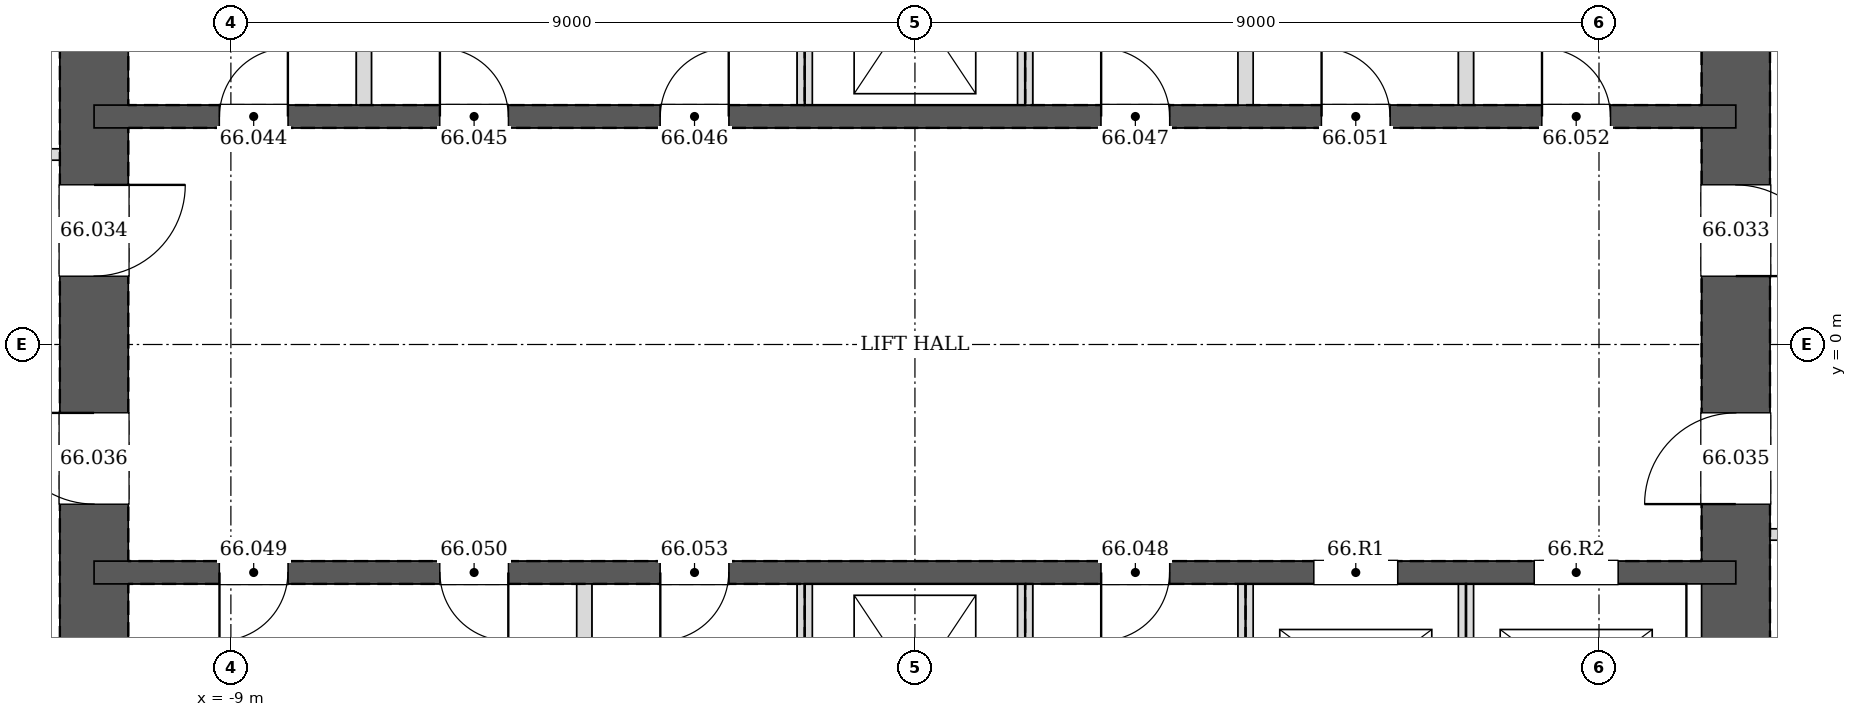
"""IFC4 building model, lengths in metres.
Left out: names, types, materials, properties, quantities, classifications, styles, units other than length and angle.
Written with IfcOpenShell. Run it as: python <this file> out.ifc"""

import sys

from ifc_helpers import new_model, si_unit, direction, frame, frame_2d, origin, place, context, subcontext, project, spatial, rectangle, extrude, element, fill, save


model = new_model("IFC4")
c1 = context("Model", 3, precision=1e-05, world=origin(), true_north=direction((0.0, 1.0)))
c2 = subcontext(c1, "Body", "Model", "MODEL_VIEW")
j1 = project(units=[si_unit("LENGTHUNIT", "METRE"), si_unit("PLANEANGLEUNIT", "RADIAN")], contexts=[c1])
p1 = place(None, origin())
s1 = spatial("IfcSite", under=j1, at=p1, CompositionType="ELEMENT")
p2 = place(p1, origin())
s2 = spatial("IfcBuilding", under=s1, at=p2, CompositionType="ELEMENT")
p3 = place(p2, frame((0.0, 0.0, 274.2)))
s3 = spatial("IfcBuildingStorey", under=s2, at=p3, CompositionType="ELEMENT", Elevation=274.2)
p4 = place(p3, frame((10.8, -10.8, 0.0), z_axis=(0.0, 0.0, 1.0), x_axis=(0.0, 1.0, 0.0)))
e1 = element("IfcWall", 1, at=p4, inside=s3, PredefinedType="SOLIDWALL", context=c2, shape_type="SweptSolid", body=[
    extrude(rectangle(XDim=21.6, YDim=0.9, at=frame_2d((10.8, 0.0))), origin(), (0.0, 0.0, 1.0), 3.4),
])
p5 = place(p4, frame((11.7, 0.0, 0.0)))
e2 = element("IfcOpeningElement", 2, at=p5, cuts=e1, PredefinedType="OPENING", context=c2, shape_type="SweptSolid", body=[
    extrude(rectangle(XDim=1.2, YDim=2.1, at=frame_2d((0.6, 1.05))), frame((0.0, 0.46, 0.0), z_axis=(0.0, -1.0, 0.0), x_axis=(1.0, 0.0, 0.0)), (0.0, 0.0, 1.0), 0.92),
])
p6 = place(p4, frame((8.7, 0.0, 0.0)))
e3 = element("IfcOpeningElement", 3, at=p6, cuts=e1, PredefinedType="OPENING", context=c2, shape_type="SweptSolid", body=[
    extrude(rectangle(XDim=1.2, YDim=2.1, at=frame_2d((0.6, 1.05))), frame((0.0, 0.46, 0.0), z_axis=(0.0, -1.0, 0.0), x_axis=(1.0, 0.0, 0.0)), (0.0, 0.0, 1.0), 0.92),
])
p7 = place(p3, frame((-10.8, 10.8, 0.0), z_axis=(0.0, 0.0, 1.0), x_axis=(0.0, -1.0, 0.0)))
e4 = element("IfcWall", 4, at=p7, inside=s3, PredefinedType="SOLIDWALL", context=c2, shape_type="SweptSolid", body=[
    extrude(rectangle(XDim=21.6, YDim=0.9, at=frame_2d((10.8, 0.0))), origin(), (0.0, 0.0, 1.0), 3.4),
])
p8 = place(p7, frame((8.7, 0.0, 0.0)))
e5 = element("IfcOpeningElement", 5, at=p8, cuts=e4, PredefinedType="OPENING", context=c2, shape_type="SweptSolid", body=[
    extrude(rectangle(XDim=1.2, YDim=2.1, at=frame_2d((0.6, 1.05))), frame((0.0, 0.46, 0.0), z_axis=(0.0, -1.0, 0.0), x_axis=(1.0, 0.0, 0.0)), (0.0, 0.0, 1.0), 0.92),
])
p9 = place(p7, frame((11.7, 0.0, 0.0)))
e6 = element("IfcOpeningElement", 6, at=p9, cuts=e4, PredefinedType="OPENING", context=c2, shape_type="SweptSolid", body=[
    extrude(rectangle(XDim=1.2, YDim=2.1, at=frame_2d((0.6, 1.05))), frame((0.0, 0.46, 0.0), z_axis=(0.0, -1.0, 0.0), x_axis=(1.0, 0.0, 0.0)), (0.0, 0.0, 1.0), 0.92),
])
p10 = place(p3, frame((-10.8, 3.0, 0.0), z_axis=(0.0, 0.0, 1.0), x_axis=(1.0, 0.0, 0.0)))
e7 = element("IfcWall", 7, at=p10, inside=s3, PredefinedType="SOLIDWALL", context=c2, shape_type="SweptSolid", body=[
    extrude(rectangle(XDim=21.6, YDim=0.3, at=frame_2d((10.8, 0.0))), origin(), (0.0, 0.0, 1.0), 3.4),
])
p11 = place(p10, frame((1.65, 0.0, 0.0)))
e8 = element("IfcOpeningElement", 8, at=p11, cuts=e7, PredefinedType="OPENING", context=c2, shape_type="SweptSolid", body=[
    extrude(rectangle(XDim=0.9, YDim=2.1, at=frame_2d((0.45, 1.05))), frame((0.0, 0.16, 0.0), z_axis=(0.0, -1.0, 0.0), x_axis=(1.0, 0.0, 0.0)), (0.0, 0.0, 1.0), 0.32),
])
p12 = place(p10, frame((4.55, 0.0, 0.0)))
e9 = element("IfcOpeningElement", 9, at=p12, cuts=e7, PredefinedType="OPENING", context=c2, shape_type="SweptSolid", body=[
    extrude(rectangle(XDim=0.9, YDim=2.1, at=frame_2d((0.45, 1.05))), frame((0.0, 0.16, 0.0), z_axis=(0.0, -1.0, 0.0), x_axis=(1.0, 0.0, 0.0)), (0.0, 0.0, 1.0), 0.32),
])
p13 = place(p10, frame((7.45, 0.0, 0.0)))
e10 = element("IfcOpeningElement", 10, at=p13, cuts=e7, PredefinedType="OPENING", context=c2, shape_type="SweptSolid", body=[
    extrude(rectangle(XDim=0.9, YDim=2.1, at=frame_2d((0.45, 1.05))), frame((0.0, 0.16, 0.0), z_axis=(0.0, -1.0, 0.0), x_axis=(1.0, 0.0, 0.0)), (0.0, 0.0, 1.0), 0.32),
])
p14 = place(p10, frame((13.25, 0.0, 0.0)))
e11 = element("IfcOpeningElement", 11, at=p14, cuts=e7, PredefinedType="OPENING", context=c2, shape_type="SweptSolid", body=[
    extrude(rectangle(XDim=0.9, YDim=2.1, at=frame_2d((0.45, 1.05))), frame((0.0, 0.16, 0.0), z_axis=(0.0, -1.0, 0.0), x_axis=(1.0, 0.0, 0.0)), (0.0, 0.0, 1.0), 0.32),
])
p15 = place(p10, frame((16.15, 0.0, 0.0)))
e12 = element("IfcOpeningElement", 12, at=p15, cuts=e7, PredefinedType="OPENING", context=c2, shape_type="SweptSolid", body=[
    extrude(rectangle(XDim=0.9, YDim=2.1, at=frame_2d((0.45, 1.05))), frame((0.0, 0.16, 0.0), z_axis=(0.0, -1.0, 0.0), x_axis=(1.0, 0.0, 0.0)), (0.0, 0.0, 1.0), 0.32),
])
p16 = place(p10, frame((19.05, 0.0, 0.0)))
e13 = element("IfcOpeningElement", 13, at=p16, cuts=e7, PredefinedType="OPENING", context=c2, shape_type="SweptSolid", body=[
    extrude(rectangle(XDim=0.9, YDim=2.1, at=frame_2d((0.45, 1.05))), frame((0.0, 0.16, 0.0), z_axis=(0.0, -1.0, 0.0), x_axis=(1.0, 0.0, 0.0)), (0.0, 0.0, 1.0), 0.32),
])
p17 = place(p3, frame((-10.8, -3.0, 0.0), z_axis=(0.0, 0.0, 1.0), x_axis=(1.0, 0.0, 0.0)))
e14 = element("IfcWall", 14, at=p17, inside=s3, PredefinedType="SOLIDWALL", context=c2, shape_type="SweptSolid", body=[
    extrude(rectangle(XDim=21.6, YDim=0.3, at=frame_2d((10.8, 0.0))), origin(), (0.0, 0.0, 1.0), 3.4),
])
p18 = place(p17, frame((13.25, 0.0, 0.0)))
e15 = element("IfcOpeningElement", 15, at=p18, cuts=e14, PredefinedType="OPENING", context=c2, shape_type="SweptSolid", body=[
    extrude(rectangle(XDim=0.9, YDim=2.1, at=frame_2d((0.45, 1.05))), frame((0.0, 0.16, 0.0), z_axis=(0.0, -1.0, 0.0), x_axis=(1.0, 0.0, 0.0)), (0.0, 0.0, 1.0), 0.32),
])
p19 = place(p17, frame((1.65, 0.0, 0.0)))
e16 = element("IfcOpeningElement", 16, at=p19, cuts=e14, PredefinedType="OPENING", context=c2, shape_type="SweptSolid", body=[
    extrude(rectangle(XDim=0.9, YDim=2.1, at=frame_2d((0.45, 1.05))), frame((0.0, 0.16, 0.0), z_axis=(0.0, -1.0, 0.0), x_axis=(1.0, 0.0, 0.0)), (0.0, 0.0, 1.0), 0.32),
])
p20 = place(p17, frame((4.55, 0.0, 0.0)))
e17 = element("IfcOpeningElement", 17, at=p20, cuts=e14, PredefinedType="OPENING", context=c2, shape_type="SweptSolid", body=[
    extrude(rectangle(XDim=0.9, YDim=2.1, at=frame_2d((0.45, 1.05))), frame((0.0, 0.16, 0.0), z_axis=(0.0, -1.0, 0.0), x_axis=(1.0, 0.0, 0.0)), (0.0, 0.0, 1.0), 0.32),
])
p21 = place(p17, frame((7.45, 0.0, 0.0)))
e18 = element("IfcOpeningElement", 18, at=p21, cuts=e14, PredefinedType="OPENING", context=c2, shape_type="SweptSolid", body=[
    extrude(rectangle(XDim=0.9, YDim=2.1, at=frame_2d((0.45, 1.05))), frame((0.0, 0.16, 0.0), z_axis=(0.0, -1.0, 0.0), x_axis=(1.0, 0.0, 0.0)), (0.0, 0.0, 1.0), 0.32),
])
p22 = place(p17, frame((16.05, 0.0, 0.0)))
e19 = element("IfcOpeningElement", 19, at=p22, cuts=e14, PredefinedType="OPENING", context=c2, shape_type="SweptSolid", body=[
    extrude(rectangle(XDim=1.1, YDim=2.1, at=frame_2d((0.55, 1.05))), frame((0.0, 0.16, 0.0), z_axis=(0.0, -1.0, 0.0), x_axis=(1.0, 0.0, 0.0)), (0.0, 0.0, 1.0), 0.32),
])
p23 = place(p17, frame((18.95, 0.0, 0.0)))
e20 = element("IfcOpeningElement", 20, at=p23, cuts=e14, PredefinedType="OPENING", context=c2, shape_type="SweptSolid", body=[
    extrude(rectangle(XDim=1.1, YDim=2.1, at=frame_2d((0.55, 1.05))), frame((0.0, 0.16, 0.0), z_axis=(0.0, -1.0, 0.0), x_axis=(1.0, 0.0, 0.0)), (0.0, 0.0, 1.0), 0.32),
])
p24 = place(p3, frame((11.25, -2.5, 0.0), z_axis=(0.0, 0.0, 1.0), x_axis=(1.0, 0.0, 0.0)))
e21 = element("IfcWall", 21, at=p24, inside=s3, PredefinedType="PARTITIONING", context=c2, shape_type="SweptSolid", body=[
    extrude(rectangle(XDim=1.8, YDim=0.15, at=frame_2d((0.9, 0.0))), origin(), (0.0, 0.0, 1.0), 3.2),
])
p25 = place(p24, frame((0.425, 0.0, 0.0)))
e22 = element("IfcOpeningElement", 22, at=p25, cuts=e21, PredefinedType="OPENING", context=c2, shape_type="SweptSolid", body=[
    extrude(rectangle(XDim=0.95, YDim=2.1, at=frame_2d((0.475, 1.05))), frame((0.0, 0.085, 0.0), z_axis=(0.0, -1.0, 0.0), x_axis=(1.0, 0.0, 0.0)), (0.0, 0.0, 1.0), 0.17),
])
p26 = place(p3, frame((-11.25, 2.5, 0.0), z_axis=(0.0, 0.0, 1.0), x_axis=(-1.0, 0.0, 0.0)))
e23 = element("IfcWall", 23, at=p26, inside=s3, PredefinedType="PARTITIONING", context=c2, shape_type="SweptSolid", body=[
    extrude(rectangle(XDim=1.8, YDim=0.15, at=frame_2d((0.9, 0.0))), origin(), (0.0, 0.0, 1.0), 3.2),
])
p27 = place(p26, frame((0.425, 0.0, 0.0)))
e24 = element("IfcOpeningElement", 24, at=p27, cuts=e23, PredefinedType="OPENING", context=c2, shape_type="SweptSolid", body=[
    extrude(rectangle(XDim=0.95, YDim=2.1, at=frame_2d((0.475, 1.05))), frame((0.0, 0.085, 0.0), z_axis=(0.0, -1.0, 0.0), x_axis=(1.0, 0.0, 0.0)), (0.0, 0.0, 1.0), 0.17),
])
for number, where, z_axis, x_axis in (
    (25, (-7.25, 3.15, 0.0), (0.0, 0.0, 1.0), (0.0, 1.0, 0.0)),
    (26, (-1.45, 3.15, 0.0), (0.0, 0.0, 1.0), (0.0, 1.0, 0.0)),
    (27, (1.45, 3.15, 0.0), (0.0, 0.0, 1.0), (0.0, 1.0, 0.0)),
    (28, (4.35, 3.15, 0.0), (0.0, 0.0, 1.0), (0.0, 1.0, 0.0)),
    (29, (7.25, 3.15, 0.0), (0.0, 0.0, 1.0), (0.0, 1.0, 0.0)),
    (30, (-4.35, -5.85, 0.0), (0.0, 0.0, 1.0), (0.0, 1.0, 0.0)),
    (31, (-1.45, -5.85, 0.0), (0.0, 0.0, 1.0), (0.0, 1.0, 0.0)),
    (32, (1.45, -5.85, 0.0), (0.0, 0.0, 1.0), (0.0, 1.0, 0.0)),
    (33, (4.35, -5.85, 0.0), (0.0, 0.0, 1.0), (0.0, 1.0, 0.0)),
):
    element("IfcWall", number, at=place(p3, frame(where, z_axis=z_axis, x_axis=x_axis)), inside=s3, PredefinedType="PARTITIONING", context=c2, shape_type="SweptSolid", body=[
        extrude(rectangle(XDim=2.7, YDim=0.2, at=frame_2d((1.35, 0.0))), origin(), (0.0, 0.0, 1.0), 3.2),
    ])
p28 = place(p3, frame((7.25, -5.85, 0.0), z_axis=(0.0, 0.0, 1.0), x_axis=(0.0, 1.0, 0.0)))
e34 = element("IfcWall", 34, at=p28, inside=s3, PredefinedType="PARTITIONING", context=c2, shape_type="SweptSolid", body=[
    extrude(rectangle(XDim=2.7, YDim=0.2, at=frame_2d((1.35, 0.0))), origin(), (0.0, 0.0, 1.0), 3.4),
])
p29 = place(p5, frame((1.2, 0.0, 0.0), z_axis=(0.0, 0.0, 1.0), x_axis=(-1.0, 0.0, 0.0)))
e35 = element("IfcDoor", 35, at=p29, inside=s3, OperationType="SINGLE_SWING_RIGHT", PredefinedType="DOOR", context=c2, shape_type="SweptSolid", body=[
    extrude(rectangle(XDim=1.2, YDim=2.1, at=frame_2d((0.6, 1.05))), frame((0.0, 0.025, 0.0), z_axis=(0.0, -1.0, 0.0), x_axis=(1.0, 0.0, 0.0)), (0.0, 0.0, 1.0), 0.05),
])
fill(e2, e35)
p30 = place(p8, origin())
e36 = element("IfcDoor", 36, at=p30, inside=s3, OperationType="SINGLE_SWING_LEFT", PredefinedType="DOOR", context=c2, shape_type="SweptSolid", body=[
    extrude(rectangle(XDim=1.2, YDim=2.1, at=frame_2d((0.6, 1.05))), frame((0.0, 0.025, 0.0), z_axis=(0.0, -1.0, 0.0), x_axis=(1.0, 0.0, 0.0)), (0.0, 0.0, 1.0), 0.05),
])
fill(e5, e36)
p31 = place(p6, origin())
e37 = element("IfcDoor", 37, at=p31, inside=s3, OperationType="SINGLE_SWING_LEFT", PredefinedType="DOOR", context=c2, shape_type="SweptSolid", body=[
    extrude(rectangle(XDim=1.2, YDim=2.1, at=frame_2d((0.6, 1.05))), frame((0.0, 0.025, 0.0), z_axis=(0.0, -1.0, 0.0), x_axis=(1.0, 0.0, 0.0)), (0.0, 0.0, 1.0), 0.05),
])
fill(e3, e37)
p32 = place(p9, frame((1.2, 0.0, 0.0), z_axis=(0.0, 0.0, 1.0), x_axis=(-1.0, 0.0, 0.0)))
e38 = element("IfcDoor", 38, at=p32, inside=s3, OperationType="SINGLE_SWING_RIGHT", PredefinedType="DOOR", context=c2, shape_type="SweptSolid", body=[
    extrude(rectangle(XDim=1.2, YDim=2.1, at=frame_2d((0.6, 1.05))), frame((0.0, 0.025, 0.0), z_axis=(0.0, -1.0, 0.0), x_axis=(1.0, 0.0, 0.0)), (0.0, 0.0, 1.0), 0.05),
])
fill(e6, e38)
p33 = place(p11, origin())
e39 = element("IfcDoor", 39, at=p33, inside=s3, OperationType="SINGLE_SWING_RIGHT", PredefinedType="DOOR", context=c2, shape_type="SweptSolid", body=[
    extrude(rectangle(XDim=0.9, YDim=2.1, at=frame_2d((0.45, 1.05))), frame((0.0, 0.025, 0.0), z_axis=(0.0, -1.0, 0.0), x_axis=(1.0, 0.0, 0.0)), (0.0, 0.0, 1.0), 0.05),
])
fill(e8, e39)
p34 = place(p12, origin())
e40 = element("IfcDoor", 40, at=p34, inside=s3, OperationType="SINGLE_SWING_LEFT", PredefinedType="DOOR", context=c2, shape_type="SweptSolid", body=[
    extrude(rectangle(XDim=0.9, YDim=2.1, at=frame_2d((0.45, 1.05))), frame((0.0, 0.025, 0.0), z_axis=(0.0, -1.0, 0.0), x_axis=(1.0, 0.0, 0.0)), (0.0, 0.0, 1.0), 0.05),
])
fill(e9, e40)
p35 = place(p13, origin())
e41 = element("IfcDoor", 41, at=p35, inside=s3, OperationType="SINGLE_SWING_RIGHT", PredefinedType="DOOR", context=c2, shape_type="SweptSolid", body=[
    extrude(rectangle(XDim=0.9, YDim=2.1, at=frame_2d((0.45, 1.05))), frame((0.0, 0.025, 0.0), z_axis=(0.0, -1.0, 0.0), x_axis=(1.0, 0.0, 0.0)), (0.0, 0.0, 1.0), 0.05),
])
fill(e10, e41)
p36 = place(p14, origin())
e42 = element("IfcDoor", 42, at=p36, inside=s3, OperationType="SINGLE_SWING_LEFT", PredefinedType="DOOR", context=c2, shape_type="SweptSolid", body=[
    extrude(rectangle(XDim=0.9, YDim=2.1, at=frame_2d((0.45, 1.05))), frame((0.0, 0.025, 0.0), z_axis=(0.0, -1.0, 0.0), x_axis=(1.0, 0.0, 0.0)), (0.0, 0.0, 1.0), 0.05),
])
fill(e11, e42)
p37 = place(p18, frame((0.9, 0.0, 0.0), z_axis=(0.0, 0.0, 1.0), x_axis=(-1.0, 0.0, 0.0)))
e43 = element("IfcDoor", 43, at=p37, inside=s3, OperationType="SINGLE_SWING_RIGHT", PredefinedType="DOOR", context=c2, shape_type="SweptSolid", body=[
    extrude(rectangle(XDim=0.9, YDim=2.1, at=frame_2d((0.45, 1.05))), frame((0.0, 0.025, 0.0), z_axis=(0.0, -1.0, 0.0), x_axis=(1.0, 0.0, 0.0)), (0.0, 0.0, 1.0), 0.05),
])
fill(e15, e43)
p38 = place(p19, frame((0.9, 0.0, 0.0), z_axis=(0.0, 0.0, 1.0), x_axis=(-1.0, 0.0, 0.0)))
e44 = element("IfcDoor", 44, at=p38, inside=s3, OperationType="SINGLE_SWING_RIGHT", PredefinedType="DOOR", context=c2, shape_type="SweptSolid", body=[
    extrude(rectangle(XDim=0.9, YDim=2.1, at=frame_2d((0.45, 1.05))), frame((0.0, 0.025, 0.0), z_axis=(0.0, -1.0, 0.0), x_axis=(1.0, 0.0, 0.0)), (0.0, 0.0, 1.0), 0.05),
])
fill(e16, e44)
p39 = place(p20, frame((0.9, 0.0, 0.0), z_axis=(0.0, 0.0, 1.0), x_axis=(-1.0, 0.0, 0.0)))
e45 = element("IfcDoor", 45, at=p39, inside=s3, OperationType="SINGLE_SWING_LEFT", PredefinedType="DOOR", context=c2, shape_type="SweptSolid", body=[
    extrude(rectangle(XDim=0.9, YDim=2.1, at=frame_2d((0.45, 1.05))), frame((0.0, 0.025, 0.0), z_axis=(0.0, -1.0, 0.0), x_axis=(1.0, 0.0, 0.0)), (0.0, 0.0, 1.0), 0.05),
])
fill(e17, e45)
p40 = place(p15, origin())
e46 = element("IfcDoor", 46, at=p40, inside=s3, OperationType="SINGLE_SWING_LEFT", PredefinedType="DOOR", context=c2, shape_type="SweptSolid", body=[
    extrude(rectangle(XDim=0.9, YDim=2.1, at=frame_2d((0.45, 1.05))), frame((0.0, 0.025, 0.0), z_axis=(0.0, -1.0, 0.0), x_axis=(1.0, 0.0, 0.0)), (0.0, 0.0, 1.0), 0.05),
])
fill(e12, e46)
p41 = place(p16, origin())
e47 = element("IfcDoor", 47, at=p41, inside=s3, OperationType="SINGLE_SWING_LEFT", PredefinedType="DOOR", context=c2, shape_type="SweptSolid", body=[
    extrude(rectangle(XDim=0.9, YDim=2.1, at=frame_2d((0.45, 1.05))), frame((0.0, 0.025, 0.0), z_axis=(0.0, -1.0, 0.0), x_axis=(1.0, 0.0, 0.0)), (0.0, 0.0, 1.0), 0.05),
])
fill(e13, e47)
p42 = place(p21, frame((0.9, 0.0, 0.0), z_axis=(0.0, 0.0, 1.0), x_axis=(-1.0, 0.0, 0.0)))
e48 = element("IfcDoor", 48, at=p42, inside=s3, OperationType="SINGLE_SWING_RIGHT", PredefinedType="DOOR", context=c2, shape_type="SweptSolid", body=[
    extrude(rectangle(XDim=0.9, YDim=2.1, at=frame_2d((0.45, 1.05))), frame((0.0, 0.025, 0.0), z_axis=(0.0, -1.0, 0.0), x_axis=(1.0, 0.0, 0.0)), (0.0, 0.0, 1.0), 0.05),
])
fill(e18, e48)
p43 = place(p22, origin())
e49 = element("IfcDoor", 49, at=p43, inside=s3, OperationType="DOUBLE_DOOR_SLIDING", PredefinedType="DOOR", context=c2, shape_type="SweptSolid", body=[
    extrude(rectangle(XDim=1.1, YDim=2.1, at=frame_2d((0.55, 1.05))), frame((0.0, 0.025, 0.0), z_axis=(0.0, -1.0, 0.0), x_axis=(1.0, 0.0, 0.0)), (0.0, 0.0, 1.0), 0.05),
])
fill(e19, e49)
p44 = place(p23, origin())
e50 = element("IfcDoor", 50, at=p44, inside=s3, OperationType="DOUBLE_DOOR_SLIDING", PredefinedType="DOOR", context=c2, shape_type="SweptSolid", body=[
    extrude(rectangle(XDim=1.1, YDim=2.1, at=frame_2d((0.55, 1.05))), frame((0.0, 0.025, 0.0), z_axis=(0.0, -1.0, 0.0), x_axis=(1.0, 0.0, 0.0)), (0.0, 0.0, 1.0), 0.05),
])
fill(e20, e50)
save(model, sys.argv[1])
